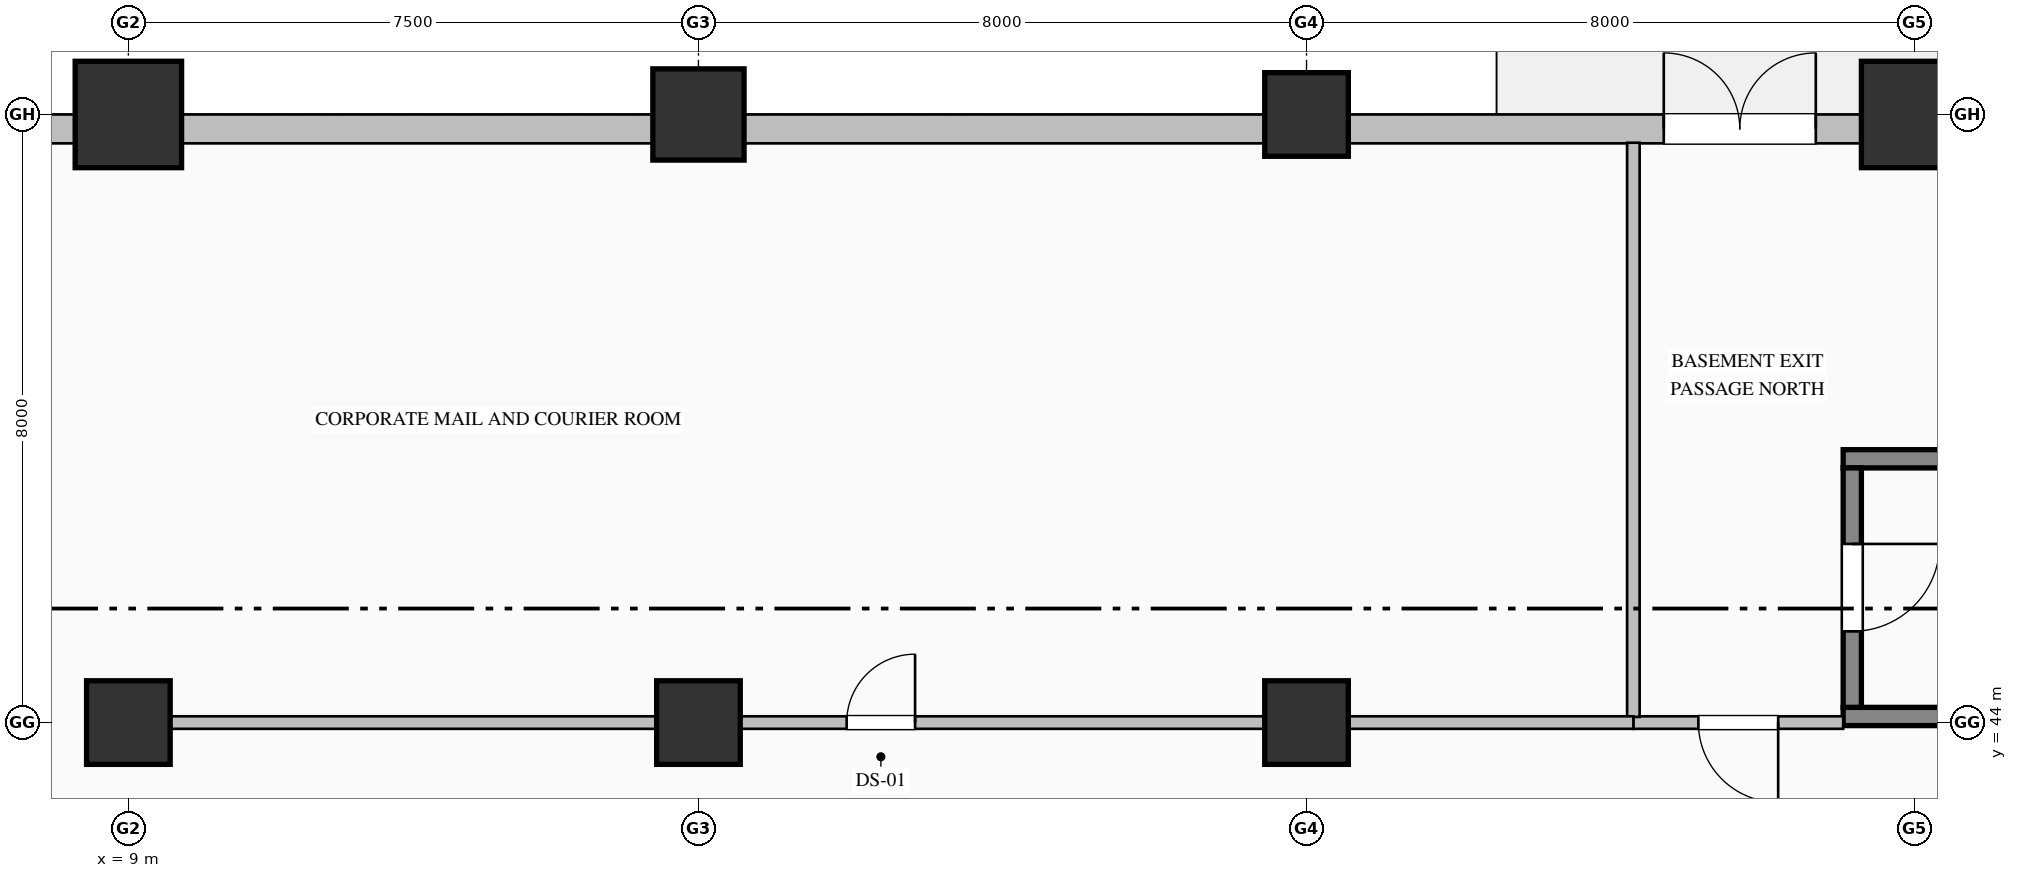
"""IFC4 building model, lengths in metres.
Left out: names, types, materials, properties, quantities, classifications, styles, units other than length and angle.
Written with IfcOpenShell. Run it as: python <this file> out.ifc"""

import sys

from ifc_helpers import new_model, si_unit, direction, frame, frame_2d, origin, origin_2d, place, context, subcontext, project, spatial, rectangle, hollow_rectangle, hollow_circle, extrude, element, fill, save


model = new_model("IFC4")
c1 = context("Model", 3, precision=1e-05, world=origin(), true_north=direction((0.0, 1.0)))
c2 = subcontext(c1, "Body", "Model", "MODEL_VIEW")
j1 = project(units=[si_unit("LENGTHUNIT", "METRE"), si_unit("PLANEANGLEUNIT", "RADIAN")], contexts=[c1])
p1 = place(None, origin())
s1 = spatial("IfcSite", under=j1, at=p1, CompositionType="ELEMENT")
p2 = place(p1, origin())
s2 = spatial("IfcBuilding", under=s1, at=p2, CompositionType="ELEMENT")
p3 = place(p2, origin())
s3 = spatial("IfcBuildingStorey", under=s2, at=p3, CompositionType="ELEMENT", Elevation=0.0)
p4 = place(p3, frame((9.0, 44.0, 0.0), z_axis=(0.0, 0.0, 1.0), x_axis=(1.0, 0.0, 0.0)))
e1 = element("IfcColumn", 1, at=p4, inside=s3, PredefinedType="COLUMN", context=c2, shape_type="SweptSolid", body=[
    extrude(rectangle(XDim=1.1, YDim=1.1, at=origin_2d()), origin(), (0.0, 0.0, 1.0), 6.0),
])
p5 = place(p3, frame((9.0, 52.0, 0.0), z_axis=(0.0, 0.0, 1.0), x_axis=(1.0, 0.0, 0.0)))
e2 = element("IfcColumn", 2, at=p5, inside=s3, PredefinedType="COLUMN", context=c2, shape_type="SweptSolid", body=[
    extrude(hollow_rectangle(XDim=1.4, YDim=1.4, WallThickness=0.05, at=origin_2d()), origin(), (0.0, 0.0, 1.0), 6.0),
])
p6 = place(p3, frame((16.5, 44.0, 0.0), z_axis=(0.0, 0.0, 1.0), x_axis=(1.0, 0.0, 0.0)))
e3 = element("IfcColumn", 3, at=p6, inside=s3, PredefinedType="COLUMN", context=c2, shape_type="SweptSolid", body=[
    extrude(rectangle(XDim=1.1, YDim=1.1, at=origin_2d()), origin(), (0.0, 0.0, 1.0), 6.0),
])
p7 = place(p3, frame((16.5, 52.0, 0.0), z_axis=(0.0, 0.0, 1.0), x_axis=(1.0, 0.0, 0.0)))
e4 = element("IfcColumn", 4, at=p7, inside=s3, PredefinedType="COLUMN", context=c2, shape_type="SweptSolid", body=[
    extrude(hollow_circle(Radius=0.6, WallThickness=0.04, at=origin_2d()), origin(), (0.0, 0.0, 1.0), 6.0),
])
p8 = place(p3, frame((24.5, 44.0, 0.0), z_axis=(0.0, 0.0, 1.0), x_axis=(1.0, 0.0, 0.0)))
e5 = element("IfcColumn", 5, at=p8, inside=s3, PredefinedType="COLUMN", context=c2, shape_type="SweptSolid", body=[
    extrude(rectangle(XDim=1.1, YDim=1.1, at=origin_2d()), origin(), (0.0, 0.0, 1.0), 6.0),
])
p9 = place(p3, frame((24.5, 52.0, 0.0), z_axis=(0.0, 0.0, 1.0), x_axis=(1.0, 0.0, 0.0)))
e6 = element("IfcColumn", 6, at=p9, inside=s3, PredefinedType="COLUMN", context=c2, shape_type="SweptSolid", body=[
    extrude(hollow_rectangle(XDim=1.1, YDim=1.1, WallThickness=0.04, at=origin_2d()), origin(), (0.0, 0.0, 1.0), 6.0),
])
p10 = place(p3, frame((32.5, 52.0, 0.0), z_axis=(0.0, 0.0, 1.0), x_axis=(1.0, 0.0, 0.0)))
e7 = element("IfcColumn", 7, at=p10, inside=s3, PredefinedType="COLUMN", context=c2, shape_type="SweptSolid", body=[
    extrude(hollow_rectangle(XDim=1.4, YDim=1.4, WallThickness=0.05, at=origin_2d()), origin(), (0.0, 0.0, 1.0), 6.0),
])
p11 = place(p3, frame((4.0, 51.81, 0.0), z_axis=(0.0, 0.0, 1.0), x_axis=(1.0, 0.0, 0.0)))
e8 = element("IfcWall", 8, at=p11, inside=s3, PredefinedType="SOLIDWALL", context=c2, shape_type="SweptSolid", body=[
    extrude(rectangle(XDim=36.52, YDim=0.38, at=frame_2d((18.26, 0.0))), origin(), (0.0, 0.0, 1.0), 5.22),
])
p12 = place(p11, frame((25.2, 0.0, 0.0)))
e9 = element("IfcOpeningElement", 9, at=p12, cuts=e8, PredefinedType="OPENING", context=c2, shape_type="SweptSolid", body=[
    extrude(rectangle(XDim=2.0, YDim=2.4, at=frame_2d((1.0, 1.2))), frame((0.0, 0.2, 0.0), z_axis=(0.0, -1.0, 0.0), x_axis=(1.0, 0.0, 0.0)), (0.0, 0.0, 1.0), 0.4),
])
p13 = place(p11, frame((34.03, 0.0, 0.0)))
e10 = element("IfcOpeningElement", 10, at=p13, cuts=e8, PredefinedType="OPENING", context=c2, shape_type="SweptSolid", body=[
    extrude(rectangle(XDim=1.6, YDim=2.35, at=frame_2d((0.8, 1.175))), frame((0.0, 0.2, 0.0), z_axis=(0.0, -1.0, 0.0), x_axis=(1.0, 0.0, 0.0)), (0.0, 0.0, 1.0), 0.4),
])
p14 = place(p3, frame((31.56, 47.47, 0.0), z_axis=(0.0, 0.0, 1.0), x_axis=(1.0, 0.0, 0.0)))
e11 = element("IfcWall", 11, at=p14, inside=s3, PredefinedType="SOLIDWALL", context=c2, shape_type="SweptSolid", body=[
    extrude(rectangle(XDim=7.88, YDim=0.24, at=frame_2d((3.94, 0.0))), origin(), (0.0, 0.0, 1.0), 6.0),
])
p15 = place(p3, frame((39.97, 44.08, 0.0), z_axis=(0.0, 0.0, 1.0), x_axis=(-1.0, 0.0, 0.0)))
e12 = element("IfcWall", 12, at=p15, inside=s3, PredefinedType="SOLIDWALL", context=c2, shape_type="SweptSolid", body=[
    extrude(rectangle(XDim=8.41, YDim=0.24, at=frame_2d((4.205, 0.0))), origin(), (0.0, 0.0, 1.0), 6.0),
])
p16 = place(p3, frame((31.68, 47.35, 0.0), z_axis=(0.0, 0.0, 1.0), x_axis=(0.0, -1.0, 0.0)))
e13 = element("IfcWall", 13, at=p16, inside=s3, PredefinedType="SOLIDWALL", context=c2, shape_type="SweptSolid", body=[
    extrude(rectangle(XDim=3.15, YDim=0.24, at=frame_2d((1.575, 0.0))), origin(), (0.0, 0.0, 1.0), 6.0),
])
p17 = place(p16, frame((1.0, 0.0, 0.0)))
e14 = element("IfcOpeningElement", 14, at=p17, cuts=e13, PredefinedType="OPENING", context=c2, shape_type="SweptSolid", body=[
    extrude(rectangle(XDim=1.15, YDim=2.2, at=frame_2d((0.575, 1.1))), frame((0.0, 0.13, 0.0), z_axis=(0.0, -1.0, 0.0), x_axis=(1.0, 0.0, 0.0)), (0.0, 0.0, 1.0), 0.26),
])
p18 = place(p3, frame((31.56, 44.0, 0.0), z_axis=(0.0, 0.0, 1.0), x_axis=(-1.0, 0.0, 0.0)))
e15 = element("IfcWall", 15, at=p18, inside=s3, PredefinedType="PARTITIONING", context=c2, shape_type="SweptSolid", body=[
    extrude(rectangle(XDim=2.76, YDim=0.165, at=frame_2d((1.38, 0.0))), origin(), (0.0, 0.0, 1.0), 5.72),
])
p19 = place(p18, frame((0.855, 0.0, 0.0)))
e16 = element("IfcOpeningElement", 16, at=p19, cuts=e15, PredefinedType="OPENING", context=c2, shape_type="SweptSolid", body=[
    extrude(rectangle(XDim=1.05, YDim=2.15, at=frame_2d((0.525, 1.075))), frame((0.0, 0.093, 0.0), z_axis=(0.0, -1.0, 0.0), x_axis=(1.0, 0.0, 0.0)), (0.0, 0.0, 1.0), 0.185),
])
p20 = place(p3, frame((28.8, 44.074, 0.0), z_axis=(0.0, 0.0, 1.0), x_axis=(0.0, 1.0, 0.0)))
e17 = element("IfcWall", 17, at=p20, inside=s3, PredefinedType="PARTITIONING", context=c2, shape_type="SweptSolid", body=[
    extrude(rectangle(XDim=7.553, YDim=0.165, at=frame_2d((3.777, 0.0))), origin(), (0.0, 0.0, 1.0), 5.72),
])
p21 = place(p3, frame((9.0, 44.0, 0.0), z_axis=(0.0, 0.0, 1.0), x_axis=(1.0, 0.0, 0.0)))
e18 = element("IfcWall", 18, at=p21, inside=s3, PredefinedType="PARTITIONING", context=c2, shape_type="SweptSolid", body=[
    extrude(rectangle(XDim=19.8, YDim=0.165, at=frame_2d((9.9, 0.0))), origin(), (0.0, 0.0, 1.0), 4.812),
])
p22 = place(p21, frame((9.45, 0.0, 0.0)))
e19 = element("IfcOpeningElement", 19, at=p22, cuts=e18, PredefinedType="OPENING", context=c2, shape_type="SweptSolid", body=[
    extrude(rectangle(XDim=0.9, YDim=2.15, at=frame_2d((0.45, 1.075))), frame((0.0, 0.093, 0.0), z_axis=(0.0, -1.0, 0.0), x_axis=(1.0, 0.0, 0.0)), (0.0, 0.0, 1.0), 0.185),
])
p23 = place(p12, origin())
e20 = element("IfcDoor", 20, at=p23, inside=s3, OperationType="DOUBLE_DOOR_SINGLE_SWING", PredefinedType="DOOR", context=c2, shape_type="SweptSolid", body=[
    extrude(rectangle(XDim=2.0, YDim=2.4, at=frame_2d((1.0, 1.2))), frame((0.0, 0.025, 0.0), z_axis=(0.0, -1.0, 0.0), x_axis=(1.0, 0.0, 0.0)), (0.0, 0.0, 1.0), 0.05),
])
fill(e9, e20)
p24 = place(p17, origin())
e21 = element("IfcDoor", 21, at=p24, inside=s3, OperationType="SINGLE_SWING_LEFT", PredefinedType="DOOR", context=c2, shape_type="SweptSolid", body=[
    extrude(rectangle(XDim=1.15, YDim=2.2, at=frame_2d((0.575, 1.1))), frame((0.0, 0.025, 0.0), z_axis=(0.0, -1.0, 0.0), x_axis=(1.0, 0.0, 0.0)), (0.0, 0.0, 1.0), 0.05),
])
fill(e14, e21)
p25 = place(p19, origin())
e22 = element("IfcDoor", 22, at=p25, inside=s3, OperationType="SINGLE_SWING_LEFT", PredefinedType="DOOR", context=c2, shape_type="SweptSolid", body=[
    extrude(rectangle(XDim=1.05, YDim=2.15, at=frame_2d((0.525, 1.075))), frame((0.0, 0.025, 0.0), z_axis=(0.0, -1.0, 0.0), x_axis=(1.0, 0.0, 0.0)), (0.0, 0.0, 1.0), 0.05),
])
fill(e16, e22)
p26 = place(p22, origin())
e23 = element("IfcDoor", 23, at=p26, inside=s3, OperationType="SINGLE_SWING_RIGHT", PredefinedType="DOOR", context=c2, shape_type="SweptSolid", body=[
    extrude(rectangle(XDim=0.9, YDim=2.15, at=frame_2d((0.45, 1.075))), frame((0.0, 0.025, 0.0), z_axis=(0.0, -1.0, 0.0), x_axis=(1.0, 0.0, 0.0)), (0.0, 0.0, 1.0), 0.05),
])
fill(e19, e23)
save(model, sys.argv[1])
